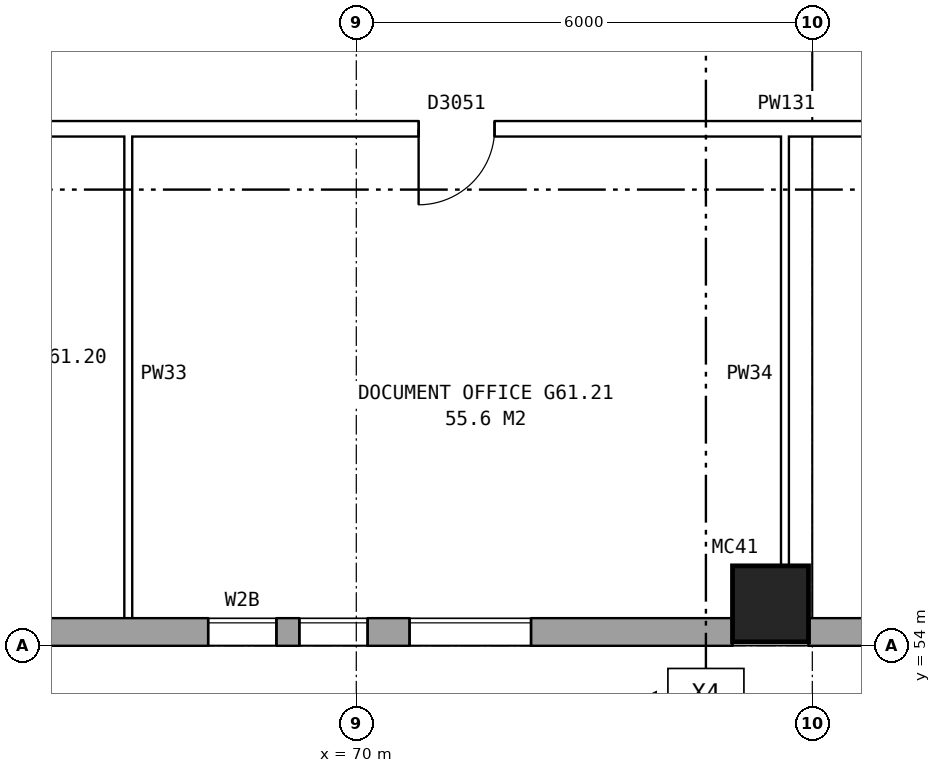
"""IFC4 building model, lengths in metres.
Left out: names, types, materials, properties, quantities, classifications, styles, units other than length and angle.
Written with IfcOpenShell. Run it as: python <this file> out.ifc"""

import sys

from ifc_helpers import new_model, si_unit, direction, frame, frame_2d, origin, origin_2d, place, context, subcontext, project, spatial, rectangle, hollow_rectangle, extrude, element, fill, save


model = new_model("IFC4")
c1 = context("Model", 3, precision=1e-05, world=origin(), true_north=direction((0.0, 1.0)))
c2 = subcontext(c1, "Body", "Model", "MODEL_VIEW")
j1 = project(units=[si_unit("LENGTHUNIT", "METRE"), si_unit("PLANEANGLEUNIT", "RADIAN")], contexts=[c1])
p1 = place(None, origin())
s1 = spatial("IfcSite", under=j1, at=p1, CompositionType="ELEMENT")
p2 = place(p1, origin())
s2 = spatial("IfcBuilding", under=s1, at=p2, CompositionType="ELEMENT")
p3 = place(p2, frame((0.0, 0.0, 215.2)))
s3 = spatial("IfcBuildingStorey", under=s2, at=p3, CompositionType="ELEMENT", Elevation=215.2)
p4 = place(p3, frame((75.45, 54.55, 0.0), z_axis=(0.0, 0.0, 1.0), x_axis=(1.0, 0.0, 0.0)))
e1 = element("IfcColumn", 1, at=p4, inside=s3, PredefinedType="COLUMN", context=c2, shape_type="SweptSolid", body=[
    extrude(hollow_rectangle(XDim=1.0, YDim=1.0, WallThickness=0.055, at=origin_2d()), origin(), (0.0, 0.0, 1.0), 6.2),
])
p5 = place(p3, frame((35.075, 54.18, 0.0), z_axis=(0.0, 0.0, 1.0), x_axis=(1.0, 0.0, 0.0)))
e2 = element("IfcWall", 2, at=p5, inside=s3, PredefinedType="STANDARD", context=c2, shape_type="SweptSolid", body=[
    extrude(rectangle(XDim=39.875, YDim=0.36, at=frame_2d((19.938, 0.0))), origin(), (0.0, 0.0, 1.0), 5.6),
])
p6 = place(p5, frame((2.625, 0.0, 0.15)))
e3 = element("IfcOpeningElement", 3, at=p6, cuts=e2, PredefinedType="OPENING", context=c2, shape_type="SweptSolid", body=[
    extrude(rectangle(XDim=1.6, YDim=2.4, at=frame_2d((0.8, 1.2))), frame((0.0, 0.19, 0.0), z_axis=(0.0, -1.0, 0.0), x_axis=(1.0, 0.0, 0.0)), (0.0, 0.0, 1.0), 0.38),
])
p7 = place(p5, frame((8.625, 0.0, 0.15)))
e4 = element("IfcOpeningElement", 4, at=p7, cuts=e2, PredefinedType="OPENING", context=c2, shape_type="SweptSolid", body=[
    extrude(rectangle(XDim=1.6, YDim=2.4, at=frame_2d((0.8, 1.2))), frame((0.0, 0.19, 0.0), z_axis=(0.0, -1.0, 0.0), x_axis=(1.0, 0.0, 0.0)), (0.0, 0.0, 1.0), 0.38),
])
p8 = place(p5, frame((11.625, 0.0, 0.15)))
e5 = element("IfcOpeningElement", 5, at=p8, cuts=e2, PredefinedType="OPENING", context=c2, shape_type="SweptSolid", body=[
    extrude(rectangle(XDim=1.6, YDim=2.4, at=frame_2d((0.8, 1.2))), frame((0.0, 0.19, 0.0), z_axis=(0.0, -1.0, 0.0), x_axis=(1.0, 0.0, 0.0)), (0.0, 0.0, 1.0), 0.38),
])
p9 = place(p5, frame((14.625, 0.0, 0.15)))
e6 = element("IfcOpeningElement", 6, at=p9, cuts=e2, PredefinedType="OPENING", context=c2, shape_type="SweptSolid", body=[
    extrude(rectangle(XDim=1.6, YDim=2.4, at=frame_2d((0.8, 1.2))), frame((0.0, 0.19, 0.0), z_axis=(0.0, -1.0, 0.0), x_axis=(1.0, 0.0, 0.0)), (0.0, 0.0, 1.0), 0.38),
])
p10 = place(p5, frame((17.625, 0.0, 0.15)))
e7 = element("IfcOpeningElement", 7, at=p10, cuts=e2, PredefinedType="OPENING", context=c2, shape_type="SweptSolid", body=[
    extrude(rectangle(XDim=1.6, YDim=2.4, at=frame_2d((0.8, 1.2))), frame((0.0, 0.19, 0.0), z_axis=(0.0, -1.0, 0.0), x_axis=(1.0, 0.0, 0.0)), (0.0, 0.0, 1.0), 0.38),
])
p11 = place(p5, frame((20.625, 0.0, 0.15)))
e8 = element("IfcOpeningElement", 8, at=p11, cuts=e2, PredefinedType="OPENING", context=c2, shape_type="SweptSolid", body=[
    extrude(rectangle(XDim=1.6, YDim=2.4, at=frame_2d((0.8, 1.2))), frame((0.0, 0.19, 0.0), z_axis=(0.0, -1.0, 0.0), x_axis=(1.0, 0.0, 0.0)), (0.0, 0.0, 1.0), 0.38),
])
p12 = place(p5, frame((23.625, 0.0, 0.15)))
e9 = element("IfcOpeningElement", 9, at=p12, cuts=e2, PredefinedType="OPENING", context=c2, shape_type="SweptSolid", body=[
    extrude(rectangle(XDim=1.6, YDim=2.4, at=frame_2d((0.8, 1.2))), frame((0.0, 0.19, 0.0), z_axis=(0.0, -1.0, 0.0), x_axis=(1.0, 0.0, 0.0)), (0.0, 0.0, 1.0), 0.38),
])
p13 = place(p5, frame((26.625, 0.0, 0.15)))
e10 = element("IfcOpeningElement", 10, at=p13, cuts=e2, PredefinedType="OPENING", context=c2, shape_type="SweptSolid", body=[
    extrude(rectangle(XDim=1.6, YDim=2.4, at=frame_2d((0.8, 1.2))), frame((0.0, 0.19, 0.0), z_axis=(0.0, -1.0, 0.0), x_axis=(1.0, 0.0, 0.0)), (0.0, 0.0, 1.0), 0.38),
])
p14 = place(p5, frame((28.525, 0.0, 0.15)))
e11 = element("IfcOpeningElement", 11, at=p14, cuts=e2, PredefinedType="OPENING", context=c2, shape_type="SweptSolid", body=[
    extrude(rectangle(XDim=1.6, YDim=2.4, at=frame_2d((0.8, 1.2))), frame((0.0, 0.19, 0.0), z_axis=(0.0, -1.0, 0.0), x_axis=(1.0, 0.0, 0.0)), (0.0, 0.0, 1.0), 0.38),
])
p15 = place(p5, frame((32.975, 0.0, 0.15)))
e12 = element("IfcOpeningElement", 12, at=p15, cuts=e2, PredefinedType="OPENING", context=c2, shape_type="SweptSolid", body=[
    extrude(rectangle(XDim=0.9, YDim=2.4, at=frame_2d((0.45, 1.2))), frame((0.0, 0.19, 0.0), z_axis=(0.0, -1.0, 0.0), x_axis=(1.0, 0.0, 0.0)), (0.0, 0.0, 1.0), 0.38),
])
p16 = place(p5, frame((35.625, 0.0, 0.15)))
e13 = element("IfcOpeningElement", 13, at=p16, cuts=e2, PredefinedType="OPENING", context=c2, shape_type="SweptSolid", body=[
    extrude(rectangle(XDim=1.6, YDim=2.4, at=frame_2d((0.8, 1.2))), frame((0.0, 0.19, 0.0), z_axis=(0.0, -1.0, 0.0), x_axis=(1.0, 0.0, 0.0)), (0.0, 0.0, 1.0), 0.38),
])
p17 = place(p5, frame((34.175, 0.0, 0.15)))
e14 = element("IfcOpeningElement", 14, at=p17, cuts=e2, PredefinedType="OPENING", context=c2, shape_type="SweptSolid", body=[
    extrude(rectangle(XDim=0.9, YDim=2.4, at=frame_2d((0.45, 1.2))), frame((0.0, 0.19, 0.0), z_axis=(0.0, -1.0, 0.0), x_axis=(1.0, 0.0, 0.0)), (0.0, 0.0, 1.0), 0.38),
])
p18 = place(p3, frame((75.95, 54.18, 0.0), z_axis=(0.0, 0.0, 1.0), x_axis=(1.0, 0.0, 0.0)))
e15 = element("IfcWall", 15, at=p18, inside=s3, PredefinedType="STANDARD", context=c2, shape_type="SweptSolid", body=[
    extrude(rectangle(XDim=55.1, YDim=0.36, at=frame_2d((27.55, 0.0))), origin(), (0.0, 0.0, 1.0), 5.6),
])
p19 = place(p18, frame((0.969, 0.0, 0.15)))
e16 = element("IfcOpeningElement", 16, at=p19, cuts=e15, PredefinedType="OPENING", context=c2, shape_type="SweptSolid", body=[
    extrude(rectangle(XDim=1.6, YDim=2.4, at=frame_2d((0.8, 1.2))), frame((0.0, 0.19, 0.0), z_axis=(0.0, -1.0, 0.0), x_axis=(1.0, 0.0, 0.0)), (0.0, 0.0, 1.0), 0.38),
])
p20 = place(p18, frame((4.406, 0.0, 0.15)))
e17 = element("IfcOpeningElement", 17, at=p20, cuts=e15, PredefinedType="OPENING", context=c2, shape_type="SweptSolid", body=[
    extrude(rectangle(XDim=1.6, YDim=2.4, at=frame_2d((0.8, 1.2))), frame((0.0, 0.19, 0.0), z_axis=(0.0, -1.0, 0.0), x_axis=(1.0, 0.0, 0.0)), (0.0, 0.0, 1.0), 0.38),
])
p21 = place(p18, frame((7.844, 0.0, 0.15)))
e18 = element("IfcOpeningElement", 18, at=p21, cuts=e15, PredefinedType="OPENING", context=c2, shape_type="SweptSolid", body=[
    extrude(rectangle(XDim=1.6, YDim=2.4, at=frame_2d((0.8, 1.2))), frame((0.0, 0.19, 0.0), z_axis=(0.0, -1.0, 0.0), x_axis=(1.0, 0.0, 0.0)), (0.0, 0.0, 1.0), 0.38),
])
p22 = place(p18, frame((11.281, 0.0, 0.15)))
e19 = element("IfcOpeningElement", 19, at=p22, cuts=e15, PredefinedType="OPENING", context=c2, shape_type="SweptSolid", body=[
    extrude(rectangle(XDim=1.6, YDim=2.4, at=frame_2d((0.8, 1.2))), frame((0.0, 0.19, 0.0), z_axis=(0.0, -1.0, 0.0), x_axis=(1.0, 0.0, 0.0)), (0.0, 0.0, 1.0), 0.38),
])
p23 = place(p18, frame((14.719, 0.0, 0.15)))
e20 = element("IfcOpeningElement", 20, at=p23, cuts=e15, PredefinedType="OPENING", context=c2, shape_type="SweptSolid", body=[
    extrude(rectangle(XDim=1.6, YDim=2.4, at=frame_2d((0.8, 1.2))), frame((0.0, 0.19, 0.0), z_axis=(0.0, -1.0, 0.0), x_axis=(1.0, 0.0, 0.0)), (0.0, 0.0, 1.0), 0.38),
])
p24 = place(p18, frame((18.156, 0.0, 0.15)))
e21 = element("IfcOpeningElement", 21, at=p24, cuts=e15, PredefinedType="OPENING", context=c2, shape_type="SweptSolid", body=[
    extrude(rectangle(XDim=1.6, YDim=2.4, at=frame_2d((0.8, 1.2))), frame((0.0, 0.19, 0.0), z_axis=(0.0, -1.0, 0.0), x_axis=(1.0, 0.0, 0.0)), (0.0, 0.0, 1.0), 0.38),
])
p25 = place(p18, frame((21.594, 0.0, 0.15)))
e22 = element("IfcOpeningElement", 22, at=p25, cuts=e15, PredefinedType="OPENING", context=c2, shape_type="SweptSolid", body=[
    extrude(rectangle(XDim=1.6, YDim=2.4, at=frame_2d((0.8, 1.2))), frame((0.0, 0.19, 0.0), z_axis=(0.0, -1.0, 0.0), x_axis=(1.0, 0.0, 0.0)), (0.0, 0.0, 1.0), 0.38),
])
p26 = place(p18, frame((25.031, 0.0, 0.15)))
e23 = element("IfcOpeningElement", 23, at=p26, cuts=e15, PredefinedType="OPENING", context=c2, shape_type="SweptSolid", body=[
    extrude(rectangle(XDim=1.6, YDim=2.4, at=frame_2d((0.8, 1.2))), frame((0.0, 0.19, 0.0), z_axis=(0.0, -1.0, 0.0), x_axis=(1.0, 0.0, 0.0)), (0.0, 0.0, 1.0), 0.38),
])
p27 = place(p18, frame((28.469, 0.0, 0.15)))
e24 = element("IfcOpeningElement", 24, at=p27, cuts=e15, PredefinedType="OPENING", context=c2, shape_type="SweptSolid", body=[
    extrude(rectangle(XDim=1.6, YDim=2.4, at=frame_2d((0.8, 1.2))), frame((0.0, 0.19, 0.0), z_axis=(0.0, -1.0, 0.0), x_axis=(1.0, 0.0, 0.0)), (0.0, 0.0, 1.0), 0.38),
])
p28 = place(p18, frame((31.906, 0.0, 0.15)))
e25 = element("IfcOpeningElement", 25, at=p28, cuts=e15, PredefinedType="OPENING", context=c2, shape_type="SweptSolid", body=[
    extrude(rectangle(XDim=1.6, YDim=2.4, at=frame_2d((0.8, 1.2))), frame((0.0, 0.19, 0.0), z_axis=(0.0, -1.0, 0.0), x_axis=(1.0, 0.0, 0.0)), (0.0, 0.0, 1.0), 0.38),
])
p29 = place(p18, frame((35.344, 0.0, 0.15)))
e26 = element("IfcOpeningElement", 26, at=p29, cuts=e15, PredefinedType="OPENING", context=c2, shape_type="SweptSolid", body=[
    extrude(rectangle(XDim=1.6, YDim=2.4, at=frame_2d((0.8, 1.2))), frame((0.0, 0.19, 0.0), z_axis=(0.0, -1.0, 0.0), x_axis=(1.0, 0.0, 0.0)), (0.0, 0.0, 1.0), 0.38),
])
p30 = place(p18, frame((38.781, 0.0, 0.15)))
e27 = element("IfcOpeningElement", 27, at=p30, cuts=e15, PredefinedType="OPENING", context=c2, shape_type="SweptSolid", body=[
    extrude(rectangle(XDim=1.6, YDim=2.4, at=frame_2d((0.8, 1.2))), frame((0.0, 0.19, 0.0), z_axis=(0.0, -1.0, 0.0), x_axis=(1.0, 0.0, 0.0)), (0.0, 0.0, 1.0), 0.38),
])
p31 = place(p18, frame((42.219, 0.0, 0.15)))
e28 = element("IfcOpeningElement", 28, at=p31, cuts=e15, PredefinedType="OPENING", context=c2, shape_type="SweptSolid", body=[
    extrude(rectangle(XDim=1.6, YDim=2.4, at=frame_2d((0.8, 1.2))), frame((0.0, 0.19, 0.0), z_axis=(0.0, -1.0, 0.0), x_axis=(1.0, 0.0, 0.0)), (0.0, 0.0, 1.0), 0.38),
])
p32 = place(p18, frame((45.656, 0.0, 0.15)))
e29 = element("IfcOpeningElement", 29, at=p32, cuts=e15, PredefinedType="OPENING", context=c2, shape_type="SweptSolid", body=[
    extrude(rectangle(XDim=1.6, YDim=2.4, at=frame_2d((0.8, 1.2))), frame((0.0, 0.19, 0.0), z_axis=(0.0, -1.0, 0.0), x_axis=(1.0, 0.0, 0.0)), (0.0, 0.0, 1.0), 0.38),
])
p33 = place(p18, frame((49.094, 0.0, 0.15)))
e30 = element("IfcOpeningElement", 30, at=p33, cuts=e15, PredefinedType="OPENING", context=c2, shape_type="SweptSolid", body=[
    extrude(rectangle(XDim=1.6, YDim=2.4, at=frame_2d((0.8, 1.2))), frame((0.0, 0.19, 0.0), z_axis=(0.0, -1.0, 0.0), x_axis=(1.0, 0.0, 0.0)), (0.0, 0.0, 1.0), 0.38),
])
p34 = place(p18, frame((52.531, 0.0, 0.15)))
e31 = element("IfcOpeningElement", 31, at=p34, cuts=e15, PredefinedType="OPENING", context=c2, shape_type="SweptSolid", body=[
    extrude(rectangle(XDim=1.6, YDim=2.4, at=frame_2d((0.8, 1.2))), frame((0.0, 0.19, 0.0), z_axis=(0.0, -1.0, 0.0), x_axis=(1.0, 0.0, 0.0)), (0.0, 0.0, 1.0), 0.38),
])
p35 = place(p3, frame((32.24, 60.8, 0.0), z_axis=(0.0, 0.0, 1.0), x_axis=(1.0, 0.0, 0.0)))
e32 = element("IfcWall", 32, at=p35, inside=s3, PredefinedType="PARTITIONING", context=c2, shape_type="SweptSolid", body=[
    extrude(rectangle(XDim=136.52, YDim=0.2, at=frame_2d((68.26, 0.0))), origin(), (0.0, 0.0, 1.0), 5.6),
])
p36 = place(p35, frame((3.44, 0.0, 0.0)))
e33 = element("IfcOpeningElement", 33, at=p36, cuts=e32, PredefinedType="OPENING", context=c2, shape_type="SweptSolid", body=[
    extrude(rectangle(XDim=1.0, YDim=2.1, at=frame_2d((0.5, 1.05))), frame((0.0, 0.11, 0.0), z_axis=(0.0, -1.0, 0.0), x_axis=(1.0, 0.0, 0.0)), (0.0, 0.0, 1.0), 0.22),
])
p37 = place(p35, frame((11.76, 0.0, 0.0)))
e34 = element("IfcOpeningElement", 34, at=p37, cuts=e32, PredefinedType="OPENING", context=c2, shape_type="SweptSolid", body=[
    extrude(rectangle(XDim=1.0, YDim=2.1, at=frame_2d((0.5, 1.05))), frame((0.0, 0.11, 0.0), z_axis=(0.0, -1.0, 0.0), x_axis=(1.0, 0.0, 0.0)), (0.0, 0.0, 1.0), 0.22),
])
p38 = place(p35, frame((20.76, 0.0, 0.0)))
e35 = element("IfcOpeningElement", 35, at=p38, cuts=e32, PredefinedType="OPENING", context=c2, shape_type="SweptSolid", body=[
    extrude(rectangle(XDim=1.0, YDim=2.1, at=frame_2d((0.5, 1.05))), frame((0.0, 0.11, 0.0), z_axis=(0.0, -1.0, 0.0), x_axis=(1.0, 0.0, 0.0)), (0.0, 0.0, 1.0), 0.22),
])
p39 = place(p35, frame((29.76, 0.0, 0.0)))
e36 = element("IfcOpeningElement", 36, at=p39, cuts=e32, PredefinedType="OPENING", context=c2, shape_type="SweptSolid", body=[
    extrude(rectangle(XDim=1.0, YDim=2.1, at=frame_2d((0.5, 1.05))), frame((0.0, 0.11, 0.0), z_axis=(0.0, -1.0, 0.0), x_axis=(1.0, 0.0, 0.0)), (0.0, 0.0, 1.0), 0.22),
])
p40 = place(p35, frame((38.58, 0.0, 0.0)))
e37 = element("IfcOpeningElement", 37, at=p40, cuts=e32, PredefinedType="OPENING", context=c2, shape_type="SweptSolid", body=[
    extrude(rectangle(XDim=1.0, YDim=2.1, at=frame_2d((0.5, 1.05))), frame((0.0, 0.11, 0.0), z_axis=(0.0, -1.0, 0.0), x_axis=(1.0, 0.0, 0.0)), (0.0, 0.0, 1.0), 0.22),
])
p41 = place(p35, frame((49.955, 0.0, 0.0)))
e38 = element("IfcOpeningElement", 38, at=p41, cuts=e32, PredefinedType="OPENING", context=c2, shape_type="SweptSolid", body=[
    extrude(rectangle(XDim=1.0, YDim=2.1, at=frame_2d((0.5, 1.05))), frame((0.0, 0.11, 0.0), z_axis=(0.0, -1.0, 0.0), x_axis=(1.0, 0.0, 0.0)), (0.0, 0.0, 1.0), 0.22),
])
p42 = place(p35, frame((63.885, 0.0, 0.0)))
e39 = element("IfcOpeningElement", 39, at=p42, cuts=e32, PredefinedType="OPENING", context=c2, shape_type="SweptSolid", body=[
    extrude(rectangle(XDim=1.0, YDim=2.1, at=frame_2d((0.5, 1.05))), frame((0.0, 0.11, 0.0), z_axis=(0.0, -1.0, 0.0), x_axis=(1.0, 0.0, 0.0)), (0.0, 0.0, 1.0), 0.22),
])
p43 = place(p35, frame((77.635, 0.0, 0.0)))
e40 = element("IfcOpeningElement", 40, at=p43, cuts=e32, PredefinedType="OPENING", context=c2, shape_type="SweptSolid", body=[
    extrude(rectangle(XDim=1.0, YDim=2.1, at=frame_2d((0.5, 1.05))), frame((0.0, 0.11, 0.0), z_axis=(0.0, -1.0, 0.0), x_axis=(1.0, 0.0, 0.0)), (0.0, 0.0, 1.0), 0.22),
])
p44 = place(p35, frame((91.565, 0.0, 0.0)))
e41 = element("IfcOpeningElement", 41, at=p44, cuts=e32, PredefinedType="OPENING", context=c2, shape_type="SweptSolid", body=[
    extrude(rectangle(XDim=1.0, YDim=2.1, at=frame_2d((0.5, 1.05))), frame((0.0, 0.11, 0.0), z_axis=(0.0, -1.0, 0.0), x_axis=(1.0, 0.0, 0.0)), (0.0, 0.0, 1.0), 0.22),
])
p45 = place(p35, frame((101.44, 0.0, 0.0)))
e42 = element("IfcOpeningElement", 42, at=p45, cuts=e32, PredefinedType="OPENING", context=c2, shape_type="SweptSolid", body=[
    extrude(rectangle(XDim=1.0, YDim=2.1, at=frame_2d((0.5, 1.05))), frame((0.0, 0.11, 0.0), z_axis=(0.0, -1.0, 0.0), x_axis=(1.0, 0.0, 0.0)), (0.0, 0.0, 1.0), 0.22),
])
p46 = place(p35, frame((108.76, 0.0, 0.0)))
e43 = element("IfcOpeningElement", 43, at=p46, cuts=e32, PredefinedType="OPENING", context=c2, shape_type="SweptSolid", body=[
    extrude(rectangle(XDim=1.0, YDim=2.1, at=frame_2d((0.5, 1.05))), frame((0.0, 0.11, 0.0), z_axis=(0.0, -1.0, 0.0), x_axis=(1.0, 0.0, 0.0)), (0.0, 0.0, 1.0), 0.22),
])
p47 = place(p35, frame((117.76, 0.0, 0.0)))
e44 = element("IfcOpeningElement", 44, at=p47, cuts=e32, PredefinedType="OPENING", context=c2, shape_type="SweptSolid", body=[
    extrude(rectangle(XDim=1.0, YDim=2.1, at=frame_2d((0.5, 1.05))), frame((0.0, 0.11, 0.0), z_axis=(0.0, -1.0, 0.0), x_axis=(1.0, 0.0, 0.0)), (0.0, 0.0, 1.0), 0.22),
])
p48 = place(p35, frame((125.26, 0.0, 0.0)))
e45 = element("IfcOpeningElement", 45, at=p48, cuts=e32, PredefinedType="OPENING", context=c2, shape_type="SweptSolid", body=[
    extrude(rectangle(XDim=1.0, YDim=2.1, at=frame_2d((0.5, 1.05))), frame((0.0, 0.11, 0.0), z_axis=(0.0, -1.0, 0.0), x_axis=(1.0, 0.0, 0.0)), (0.0, 0.0, 1.0), 0.22),
])
p49 = place(p35, frame((132.08, 0.0, 0.0)))
e46 = element("IfcOpeningElement", 46, at=p49, cuts=e32, PredefinedType="OPENING", context=c2, shape_type="SweptSolid", body=[
    extrude(rectangle(XDim=1.0, YDim=2.1, at=frame_2d((0.5, 1.05))), frame((0.0, 0.11, 0.0), z_axis=(0.0, -1.0, 0.0), x_axis=(1.0, 0.0, 0.0)), (0.0, 0.0, 1.0), 0.22),
])
for number, where, z_axis, x_axis in (
    (47, (67.0, 54.24, 0.0), (0.0, 0.0, 1.0), (0.0, 1.0, 0.0)),
    (48, (75.64, 54.24, 0.0), (0.0, 0.0, 1.0), (0.0, 1.0, 0.0)),
):
    element("IfcWall", number, at=place(p3, frame(where, z_axis=z_axis, x_axis=x_axis)), inside=s3, PredefinedType="PARTITIONING", context=c2, shape_type="SweptSolid", body=[
        extrude(rectangle(XDim=6.66, YDim=0.1, at=frame_2d((3.33, 0.0))), origin(), (0.0, 0.0, 1.0), 5.6),
    ])
p50 = place(p15, origin())
e49 = element("IfcWindow", 49, at=p50, inside=s3, PartitioningType="SINGLE_PANEL", PredefinedType="WINDOW", context=c2, shape_type="SweptSolid", body=[
    extrude(rectangle(XDim=0.9, YDim=2.4, at=frame_2d((0.45, 1.2))), frame((0.0, 0.15, 0.0), z_axis=(0.0, -1.0, 0.0), x_axis=(1.0, 0.0, 0.0)), (0.0, 0.0, 1.0), 0.06),
])
fill(e12, e49)
p51 = place(p16, origin())
e50 = element("IfcWindow", 50, at=p51, inside=s3, PartitioningType="SINGLE_PANEL", PredefinedType="WINDOW", context=c2, shape_type="SweptSolid", body=[
    extrude(rectangle(XDim=1.6, YDim=2.4, at=frame_2d((0.8, 1.2))), frame((0.0, 0.15, 0.0), z_axis=(0.0, -1.0, 0.0), x_axis=(1.0, 0.0, 0.0)), (0.0, 0.0, 1.0), 0.06),
])
fill(e13, e50)
p52 = place(p40, frame((1.0, 0.0, 0.0), z_axis=(0.0, 0.0, 1.0), x_axis=(-1.0, 0.0, 0.0)))
e51 = element("IfcDoor", 51, at=p52, inside=s3, OperationType="SINGLE_SWING_RIGHT", PredefinedType="DOOR", context=c2, shape_type="SweptSolid", body=[
    extrude(rectangle(XDim=1.0, YDim=2.1, at=frame_2d((0.5, 1.05))), frame((0.0, 0.025, 0.0), z_axis=(0.0, -1.0, 0.0), x_axis=(1.0, 0.0, 0.0)), (0.0, 0.0, 1.0), 0.05),
])
fill(e37, e51)
p53 = place(p17, origin())
e52 = element("IfcWindow", 52, at=p53, inside=s3, PartitioningType="SINGLE_PANEL", PredefinedType="WINDOW", context=c2, shape_type="SweptSolid", body=[
    extrude(rectangle(XDim=0.9, YDim=2.4, at=frame_2d((0.45, 1.2))), frame((0.0, 0.15, 0.0), z_axis=(0.0, -1.0, 0.0), x_axis=(1.0, 0.0, 0.0)), (0.0, 0.0, 1.0), 0.06),
])
fill(e14, e52)
save(model, sys.argv[1])
